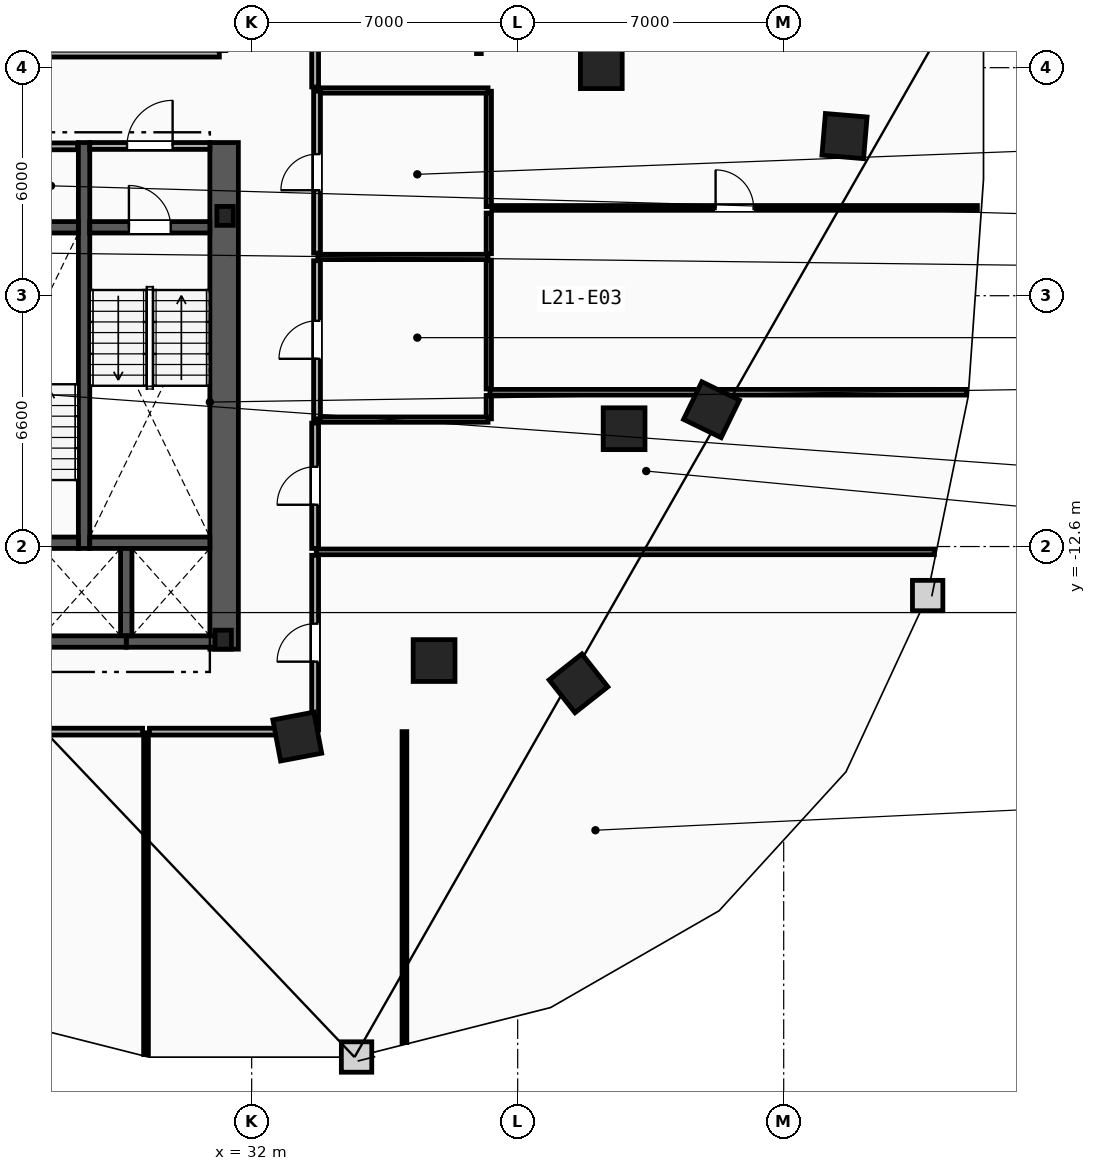
"""IFC4 building model, lengths in metres.
Left out: names, types, materials, properties, quantities, classifications, styles, units other than length and angle.
Written with IfcOpenShell. Run it as: python <this file> out.ifc"""

import sys

from ifc_helpers import new_model, si_unit, direction, frame, frame_2d, origin, origin_2d, place, context, subcontext, project, spatial, rectangle, i_section, extrude, element, fill, save


model = new_model("IFC4")
c1 = context("Model", 3, precision=1e-05, world=origin(), true_north=direction((0.0, 1.0)))
c2 = subcontext(c1, "Body", "Model", "MODEL_VIEW")
j1 = project(units=[si_unit("LENGTHUNIT", "METRE"), si_unit("PLANEANGLEUNIT", "RADIAN")], contexts=[c1])
p1 = place(None, origin())
s1 = spatial("IfcSite", under=j1, at=p1, CompositionType="ELEMENT")
p2 = place(p1, origin())
s2 = spatial("IfcBuilding", under=s1, at=p2, CompositionType="ELEMENT")
p3 = place(p2, frame((0.0, 0.0, 85.4)))
s3 = spatial("IfcBuildingStorey", under=s2, at=p3, CompositionType="ELEMENT", Elevation=85.4)
for number, where, z_axis, x_axis in (
    (1, (31.3, -3.9, 0.0), (0.0, 0.0, 1.0), (1.0, 0.0, 0.0)),
    (2, (31.25, -15.05, 0.0), (0.0, 0.0, 1.0), (1.0, 0.0, 0.0)),
):
    element("IfcColumn", number, at=place(p3, frame(where, z_axis=z_axis, x_axis=x_axis)), inside=s3, PredefinedType="COLUMN", context=c2, shape_type="SweptSolid", body=[
        extrude(i_section(OverallWidth=0.432, OverallDepth=0.498, WebThickness=0.056, FlangeThickness=0.089, FilletRadius=0.018, at=origin_2d()), origin(), (0.0, 0.0, 1.0), 3.6),
    ])
for number, where, z_axis, x_axis in (
    (3, (41.2, 0.0, 0.0), (0.0, 0.0, 1.0), (1.0, 0.0, 0.0)),
    (4, (41.8, -9.5, 0.0), (0.0, 0.0, 1.0), (1.0, 0.0, 0.0)),
    (5, (36.8, -15.6, 0.0), (0.0, 0.0, 1.0), (1.0, 0.0, 0.0)),
    (6, (33.2, -17.6, 0.0), (0.0, 0.0, 1.0), (0.983, 0.186, 0.0)),
    (7, (40.6, -16.2, 0.0), (0.0, 0.0, 1.0), (0.785, 0.619, 0.0)),
    (8, (44.1, -9.0, 0.0), (0.0, 0.0, 1.0), (0.437, 0.899, 0.0)),
    (9, (47.6, -1.8, 0.0), (0.0, 0.0, 1.0), (0.084, 0.997, 0.0)),
):
    element("IfcColumn", number, at=place(p3, frame(where, z_axis=z_axis, x_axis=x_axis)), inside=s3, PredefinedType="COLUMN", context=c2, shape_type="SweptSolid", body=[
        extrude(rectangle(XDim=1.1, YDim=1.1, at=origin_2d()), origin(), (0.0, 0.0, 1.0), 3.6),
    ])
p4 = place(p3, frame((31.275, -15.3, 0.0), z_axis=(0.0, 0.0, 1.0), x_axis=(0.0, 1.0, 0.0)))
e10 = element("IfcWall", 10, at=p4, inside=s3, PredefinedType="SHEAR", context=c2, shape_type="SweptSolid", body=[
    extrude(rectangle(XDim=13.33, YDim=0.75, at=frame_2d((6.665, 0.0))), origin(), (0.0, 0.0, 1.0), 3.3),
])
p5 = place(p3, frame((27.59, -12.65, 0.0), z_axis=(0.0, 0.0, 1.0), x_axis=(0.0, 1.0, 0.0)))
e11 = element("IfcWall", 11, at=p5, inside=s3, PredefinedType="SHEAR", context=c2, shape_type="SweptSolid", body=[
    extrude(rectangle(XDim=10.68, YDim=0.3, at=frame_2d((5.34, 0.0))), origin(), (0.0, 0.0, 1.0), 3.3),
])
p6 = place(p3, frame((27.74, -4.2, 0.0), z_axis=(0.0, 0.0, 1.0), x_axis=(1.0, 0.0, 0.0)))
e12 = element("IfcWall", 12, at=p6, inside=s3, PredefinedType="SHEAR", context=c2, shape_type="SweptSolid", body=[
    extrude(rectangle(XDim=3.16, YDim=0.3, at=frame_2d((1.58, 0.0))), origin(), (0.0, 0.0, 1.0), 3.3),
])
p7 = place(p6, frame((1.03, 0.0, 0.0)))
e13 = element("IfcOpeningElement", 13, at=p7, cuts=e12, PredefinedType="OPENING", context=c2, shape_type="SweptSolid", body=[
    extrude(rectangle(XDim=1.1, YDim=2.15, at=frame_2d((0.55, 1.075))), frame((0.0, 0.16, 0.0), z_axis=(0.0, -1.0, 0.0), x_axis=(1.0, 0.0, 0.0)), (0.0, 0.0, 1.0), 0.32),
])
p8 = place(p3, frame((27.74, -12.5, 0.0), z_axis=(0.0, 0.0, 1.0), x_axis=(1.0, 0.0, 0.0)))
e14 = element("IfcWall", 14, at=p8, inside=s3, PredefinedType="SHEAR", context=c2, shape_type="SweptSolid", body=[
    extrude(rectangle(XDim=3.16, YDim=0.3, at=frame_2d((1.58, 0.0))), origin(), (0.0, 0.0, 1.0), 3.3),
])
p9 = place(p3, frame((24.28, -12.5, 0.0), z_axis=(0.0, 0.0, 1.0), x_axis=(1.0, 0.0, 0.0)))
e15 = element("IfcWall", 15, at=p9, inside=s3, PredefinedType="SHEAR", context=c2, shape_type="SweptSolid", body=[
    extrude(rectangle(XDim=3.16, YDim=0.3, at=frame_2d((1.58, 0.0))), origin(), (0.0, 0.0, 1.0), 3.3),
])
p10 = place(p9, frame((1.03, 0.0, 0.0)))
e16 = element("IfcOpeningElement", 16, at=p10, cuts=e15, PredefinedType="OPENING", context=c2, shape_type="SweptSolid", body=[
    extrude(rectangle(XDim=1.1, YDim=2.15, at=frame_2d((0.55, 1.075))), frame((0.0, 0.16, 0.0), z_axis=(0.0, -1.0, 0.0), x_axis=(1.0, 0.0, 0.0)), (0.0, 0.0, 1.0), 0.32),
])
p11 = place(p3, frame((24.28, -4.2, 0.0), z_axis=(0.0, 0.0, 1.0), x_axis=(1.0, 0.0, 0.0)))
e17 = element("IfcWall", 17, at=p11, inside=s3, PredefinedType="SHEAR", context=c2, shape_type="SweptSolid", body=[
    extrude(rectangle(XDim=3.16, YDim=0.3, at=frame_2d((1.58, 0.0))), origin(), (0.0, 0.0, 1.0), 3.3),
])
p12 = place(p3, frame((27.74, -2.06, 0.0), z_axis=(0.0, 0.0, 1.0), x_axis=(1.0, 0.0, 0.0)))
e18 = element("IfcWall", 18, at=p12, inside=s3, PredefinedType="PARTITIONING", context=c2, shape_type="SweptSolid", body=[
    extrude(rectangle(XDim=3.16, YDim=0.18, at=frame_2d((1.58, 0.0))), origin(), (0.0, 0.0, 1.0), 3.3),
])
p13 = place(p12, frame((0.98, 0.0, 0.0)))
e19 = element("IfcOpeningElement", 19, at=p13, cuts=e18, PredefinedType="OPENING", context=c2, shape_type="SweptSolid", body=[
    extrude(rectangle(XDim=1.2, YDim=2.15, at=frame_2d((0.6, 1.075))), frame((0.0, 0.1, 0.0), z_axis=(0.0, -1.0, 0.0), x_axis=(1.0, 0.0, 0.0)), (0.0, 0.0, 1.0), 0.2),
])
p14 = place(p3, frame((28.7, -15.1, 0.0), z_axis=(0.0, 0.0, 1.0), x_axis=(1.0, 0.0, 0.0)))
e20 = element("IfcWall", 20, at=p14, inside=s3, PredefinedType="SHEAR", context=c2, shape_type="SweptSolid", body=[
    extrude(rectangle(XDim=2.5, YDim=0.3, at=frame_2d((1.25, 0.0))), origin(), (0.0, 0.0, 1.0), 3.3),
])
p15 = place(p3, frame((28.7, -14.95, 0.0), z_axis=(0.0, 0.0, 1.0), x_axis=(0.0, 1.0, 0.0)))
e21 = element("IfcWall", 21, at=p15, inside=s3, PredefinedType="SHEAR", context=c2, shape_type="SweptSolid", body=[
    extrude(rectangle(XDim=2.3, YDim=0.3, at=frame_2d((1.15, 0.0))), origin(), (0.0, 0.0, 1.0), 3.3),
])
p16 = place(p3, frame((26.2, -15.1, 0.0), z_axis=(0.0, 0.0, 1.0), x_axis=(1.0, 0.0, 0.0)))
e22 = element("IfcWall", 22, at=p16, inside=s3, PredefinedType="SHEAR", context=c2, shape_type="SweptSolid", body=[
    extrude(rectangle(XDim=2.5, YDim=0.3, at=frame_2d((1.25, 0.0))), origin(), (0.0, 0.0, 1.0), 3.3),
])
p17 = place(p3, frame((24.3, -2.07, 0.0), z_axis=(0.0, 0.0, 1.0), x_axis=(1.0, 0.0, 0.0)))
e23 = element("IfcWall", 23, at=p17, inside=s3, PredefinedType="PARTITIONING", context=c2, shape_type="SweptSolid", body=[
    extrude(rectangle(XDim=3.12, YDim=0.18, at=frame_2d((1.56, 0.0))), origin(), (0.0, 0.0, 1.0), 3.3),
])
p18 = place(p17, frame((1.085, 0.0, 0.0)))
e24 = element("IfcOpeningElement", 24, at=p18, cuts=e23, PredefinedType="OPENING", context=c2, shape_type="SweptSolid", body=[
    extrude(rectangle(XDim=0.95, YDim=2.1, at=frame_2d((0.475, 1.05))), frame((0.0, 0.1, 0.0), z_axis=(0.0, -1.0, 0.0), x_axis=(1.0, 0.0, 0.0)), (0.0, 0.0, 1.0), 0.2),
])
p19 = place(p3, frame((38.24, -9.24, 0.0), z_axis=(0.0, 0.0, 1.0), x_axis=(0.0, 1.0, 0.0)))
e25 = element("IfcWall", 25, at=p19, inside=s3, PredefinedType="PARTITIONING", context=c2, shape_type="SweptSolid", body=[
    extrude(rectangle(XDim=0.615, YDim=0.14, at=frame_2d((0.308, 0.0))), origin(), (0.0, 0.0, 1.0), 3.3),
])
p20 = place(p3, frame((38.24, -8.455, 0.0), z_axis=(0.0, 0.0, 1.0), x_axis=(0.0, 1.0, 0.0)))
e26 = element("IfcWall", 26, at=p20, inside=s3, PredefinedType="PARTITIONING", context=c2, shape_type="SweptSolid", body=[
    extrude(rectangle(XDim=3.39, YDim=0.14, at=frame_2d((1.695, 0.0))), origin(), (0.0, 0.0, 1.0), 3.3),
])
p21 = place(p3, frame((38.24, -4.895, 0.0), z_axis=(0.0, 0.0, 1.0), x_axis=(0.0, 1.0, 0.0)))
e27 = element("IfcWall", 27, at=p21, inside=s3, PredefinedType="PARTITIONING", context=c2, shape_type="SweptSolid", body=[
    extrude(rectangle(XDim=1.07, YDim=0.14, at=frame_2d((0.535, 0.0))), origin(), (0.0, 0.0, 1.0), 3.3),
])
p22 = place(p3, frame((38.24, -3.655, 0.0), z_axis=(0.0, 0.0, 1.0), x_axis=(0.0, 1.0, 0.0)))
e28 = element("IfcWall", 28, at=p22, inside=s3, PredefinedType="PARTITIONING", context=c2, shape_type="SweptSolid", body=[
    extrude(rectangle(XDim=3.035, YDim=0.14, at=frame_2d((1.518, 0.0))), origin(), (0.0, 0.0, 1.0), 3.3),
])
for number, where, z_axis, x_axis in (
    (29, (33.74, -0.6, 0.0), (0.0, 0.0, 1.0), (1.0, 0.0, 0.0)),
    (30, (33.74, -4.98, 0.0), (0.0, 0.0, 1.0), (1.0, 0.0, 0.0)),
    (31, (33.74, -9.26, 0.0), (0.0, 0.0, 1.0), (1.0, 0.0, 0.0)),
):
    element("IfcWall", number, at=place(p3, frame(where, z_axis=z_axis, x_axis=x_axis)), inside=s3, PredefinedType="PARTITIONING", context=c2, shape_type="SweptSolid", body=[
        extrude(rectangle(XDim=4.48, YDim=0.14, at=frame_2d((2.24, 0.0))), origin(), (0.0, 0.0, 1.0), 3.3),
    ])
p23 = place(p3, frame((33.72, -4.88, 0.0), z_axis=(0.0, 0.0, 1.0), x_axis=(0.0, 1.0, 0.0)))
e32 = element("IfcWall", 32, at=p23, inside=s3, PredefinedType="PARTITIONING", context=c2, shape_type="SweptSolid", body=[
    extrude(rectangle(XDim=4.26, YDim=0.18, at=frame_2d((2.13, 0.0))), origin(), (0.0, 0.0, 1.0), 3.3),
])
p24 = place(p23, frame((1.655, 0.0, 0.0)))
e33 = element("IfcOpeningElement", 33, at=p24, cuts=e32, PredefinedType="OPENING", context=c2, shape_type="SweptSolid", body=[
    extrude(rectangle(XDim=0.95, YDim=2.1, at=frame_2d((0.475, 1.05))), frame((0.0, 0.1, 0.0), z_axis=(0.0, -1.0, 0.0), x_axis=(1.0, 0.0, 0.0)), (0.0, 0.0, 1.0), 0.2),
])
p25 = place(p3, frame((33.72, -9.24, 0.0), z_axis=(0.0, 0.0, 1.0), x_axis=(0.0, 1.0, 0.0)))
e34 = element("IfcWall", 34, at=p25, inside=s3, PredefinedType="PARTITIONING", context=c2, shape_type="SweptSolid", body=[
    extrude(rectangle(XDim=4.16, YDim=0.18, at=frame_2d((2.08, 0.0))), origin(), (0.0, 0.0, 1.0), 3.3),
])
p26 = place(p25, frame((1.58, 0.0, 0.0)))
e35 = element("IfcOpeningElement", 35, at=p26, cuts=e34, PredefinedType="OPENING", context=c2, shape_type="SweptSolid", body=[
    extrude(rectangle(XDim=1.0, YDim=2.15, at=frame_2d((0.5, 1.075))), frame((0.0, 0.1, 0.0), z_axis=(0.0, -1.0, 0.0), x_axis=(1.0, 0.0, 0.0)), (0.0, 0.0, 1.0), 0.2),
])
p27 = place(p3, frame((37.98, 0.37, 0.0), z_axis=(0.0, 0.0, 1.0), x_axis=(0.0, 1.0, 0.0)))
e36 = element("IfcWall", 36, at=p27, inside=s3, PredefinedType="PARTITIONING", context=c2, shape_type="SweptSolid", body=[
    extrude(rectangle(XDim=11.08, YDim=0.125, at=frame_2d((5.54, 0.0))), origin(), (0.0, 0.0, 1.0), 3.3),
])
p28 = place(p3, frame((38.27, -8.54, 0.0), z_axis=(0.0, 0.0, 1.0), x_axis=(1.0, 0.0, 0.0)))
e37 = element("IfcWall", 37, at=p28, inside=s3, PredefinedType="PARTITIONING", context=c2, shape_type="SweptSolid", body=[
    extrude(rectangle(XDim=12.543, YDim=0.15, at=frame_2d((6.271, 0.0))), origin(), (0.0, 0.0, 1.0), 3.3),
])
p29 = place(p3, frame((33.7, -12.74, 0.0), z_axis=(0.0, 0.0, 1.0), x_axis=(1.0, 0.0, 0.0)))
e38 = element("IfcWall", 38, at=p29, inside=s3, PredefinedType="PARTITIONING", context=c2, shape_type="SweptSolid", body=[
    extrude(rectangle(XDim=16.264, YDim=0.15, at=frame_2d((8.132, 0.0))), origin(), (0.0, 0.0, 1.0), 3.3),
])
p30 = place(p3, frame((29.22, -25.966, 0.0), z_axis=(0.0, 0.0, 1.0), x_axis=(0.0, 1.0, 0.0)))
e39 = element("IfcWall", 39, at=p30, inside=s3, PredefinedType="PARTITIONING", context=c2, shape_type="SweptSolid", body=[
    extrude(rectangle(XDim=8.466, YDim=0.125, at=frame_2d((4.233, 0.0))), origin(), (0.0, 0.0, 1.0), 3.3),
])
p31 = place(p3, frame((36.02, -25.652, 0.0), z_axis=(0.0, 0.0, 1.0), x_axis=(0.0, 1.0, 0.0)))
e40 = element("IfcWall", 40, at=p31, inside=s3, PredefinedType="PARTITIONING", context=c2, shape_type="SweptSolid", body=[
    extrude(rectangle(XDim=8.182, YDim=0.125, at=frame_2d((4.091, 0.0))), origin(), (0.0, 0.0, 1.0), 3.3),
])
p32 = place(p3, frame((33.67, -17.428, 0.0), z_axis=(0.0, 0.0, 1.0), x_axis=(0.0, 1.0, 0.0)))
e41 = element("IfcWall", 41, at=p32, inside=s3, PredefinedType="PARTITIONING", context=c2, shape_type="SweptSolid", body=[
    extrude(rectangle(XDim=4.598, YDim=0.18, at=frame_2d((2.299, 0.0))), origin(), (0.0, 0.0, 1.0), 3.3),
])
p33 = place(p32, frame((1.799, 0.0, 0.0)))
e42 = element("IfcOpeningElement", 42, at=p33, cuts=e41, PredefinedType="OPENING", context=c2, shape_type="SweptSolid", body=[
    extrude(rectangle(XDim=1.0, YDim=2.15, at=frame_2d((0.5, 1.075))), frame((0.0, 0.1, 0.0), z_axis=(0.0, -1.0, 0.0), x_axis=(1.0, 0.0, 0.0)), (0.0, 0.0, 1.0), 0.2),
])
p34 = place(p3, frame((29.31, -17.47, 0.0), z_axis=(0.0, 0.0, 1.0), x_axis=(1.0, 0.0, 0.0)))
e43 = element("IfcWall", 43, at=p34, inside=s3, PredefinedType="PARTITIONING", context=c2, shape_type="SweptSolid", body=[
    extrude(rectangle(XDim=4.318, YDim=0.18, at=frame_2d((2.159, 0.0))), origin(), (0.0, 0.0, 1.0), 3.3),
])
p35 = place(p3, frame((33.67, -12.65, 0.0), z_axis=(0.0, 0.0, 1.0), x_axis=(0.0, 1.0, 0.0)))
e44 = element("IfcWall", 44, at=p35, inside=s3, PredefinedType="PARTITIONING", context=c2, shape_type="SweptSolid", body=[
    extrude(rectangle(XDim=3.299, YDim=0.18, at=frame_2d((1.649, 0.0))), origin(), (0.0, 0.0, 1.0), 3.3),
])
p36 = place(p35, frame((1.149, 0.0, 0.0)))
e45 = element("IfcOpeningElement", 45, at=p36, cuts=e44, PredefinedType="OPENING", context=c2, shape_type="SweptSolid", body=[
    extrude(rectangle(XDim=1.0, YDim=2.15, at=frame_2d((0.5, 1.075))), frame((0.0, 0.1, 0.0), z_axis=(0.0, -1.0, 0.0), x_axis=(1.0, 0.0, 0.0)), (0.0, 0.0, 1.0), 0.2),
])
p37 = place(p3, frame((31.15, 0.37, 0.0), z_axis=(0.0, 0.0, 1.0), x_axis=(-1.0, 0.0, 0.0)))
e46 = element("IfcWall", 46, at=p37, inside=s3, PredefinedType="PARTITIONING", context=c2, shape_type="SweptSolid", body=[
    extrude(rectangle(XDim=14.328, YDim=0.18, at=frame_2d((7.164, 0.0))), origin(), (0.0, 0.0, 1.0), 3.3),
])
p38 = place(p37, frame((6.664, 0.0, 0.0)))
e47 = element("IfcOpeningElement", 47, at=p38, cuts=e46, PredefinedType="OPENING", context=c2, shape_type="SweptSolid", body=[
    extrude(rectangle(XDim=1.0, YDim=2.15, at=frame_2d((0.5, 1.075))), frame((0.0, 0.1, 0.0), z_axis=(0.0, -1.0, 0.0), x_axis=(1.0, 0.0, 0.0)), (0.0, 0.0, 1.0), 0.2),
])
p39 = place(p3, frame((16.822, -17.47, 0.0), z_axis=(0.0, 0.0, 1.0), x_axis=(1.0, 0.0, 0.0)))
e48 = element("IfcWall", 48, at=p39, inside=s3, PredefinedType="PARTITIONING", context=c2, shape_type="SweptSolid", body=[
    extrude(rectangle(XDim=12.308, YDim=0.18, at=frame_2d((6.154, 0.0))), origin(), (0.0, 0.0, 1.0), 3.3),
])
p40 = place(p3, frame((33.67, -0.509, 0.0), z_axis=(0.0, 0.0, 1.0), x_axis=(0.0, 1.0, 0.0)))
e49 = element("IfcWall", 49, at=p40, inside=s3, PredefinedType="PARTITIONING", context=c2, shape_type="SweptSolid", body=[
    extrude(rectangle(XDim=11.908, YDim=0.18, at=frame_2d((5.954, 0.0))), origin(), (0.0, 0.0, 1.0), 3.3),
])
p41 = place(p40, frame((5.454, 0.0, 0.0)))
e50 = element("IfcOpeningElement", 50, at=p41, cuts=e49, PredefinedType="OPENING", context=c2, shape_type="SweptSolid", body=[
    extrude(rectangle(XDim=1.0, YDim=2.15, at=frame_2d((0.5, 1.075))), frame((0.0, 0.1, 0.0), z_axis=(0.0, -1.0, 0.0), x_axis=(1.0, 0.0, 0.0)), (0.0, 0.0, 1.0), 0.2),
])
p42 = place(p3, frame((38.32, -3.69, 0.0), z_axis=(0.0, 0.0, 1.0), x_axis=(1.0, 0.0, 0.0)))
e51 = element("IfcWall", 51, at=p42, inside=s3, PredefinedType="PARTITIONING", context=c2, shape_type="SweptSolid", body=[
    extrude(rectangle(XDim=12.776, YDim=0.125, at=frame_2d((6.388, 0.0))), origin(), (0.0, 0.0, 1.0), 3.3),
])
p43 = place(p42, frame((5.888, 0.0, 0.0)))
e52 = element("IfcOpeningElement", 52, at=p43, cuts=e51, PredefinedType="OPENING", context=c2, shape_type="SweptSolid", body=[
    extrude(rectangle(XDim=1.0, YDim=2.15, at=frame_2d((0.5, 1.075))), frame((0.0, 0.073, 0.0), z_axis=(0.0, -1.0, 0.0), x_axis=(1.0, 0.0, 0.0)), (0.0, 0.0, 1.0), 0.145),
])
p44 = place(p7, origin())
e53 = element("IfcDoor", 53, at=p44, inside=s3, OperationType="SINGLE_SWING_LEFT", PredefinedType="DOOR", context=c2, shape_type="SweptSolid", body=[
    extrude(rectangle(XDim=1.1, YDim=2.15, at=frame_2d((0.55, 1.075))), frame((0.0, 0.025, 0.0), z_axis=(0.0, -1.0, 0.0), x_axis=(1.0, 0.0, 0.0)), (0.0, 0.0, 1.0), 0.05),
])
fill(e13, e53)
p45 = place(p13, origin())
e54 = element("IfcDoor", 54, at=p45, inside=s3, OperationType="SINGLE_SWING_RIGHT", PredefinedType="DOOR", context=c2, shape_type="SweptSolid", body=[
    extrude(rectangle(XDim=1.2, YDim=2.15, at=frame_2d((0.6, 1.075))), frame((0.0, 0.025, 0.0), z_axis=(0.0, -1.0, 0.0), x_axis=(1.0, 0.0, 0.0)), (0.0, 0.0, 1.0), 0.05),
])
fill(e19, e54)
p46 = place(p43, origin())
e55 = element("IfcDoor", 55, at=p46, inside=s3, OperationType="SINGLE_SWING_LEFT", PredefinedType="DOOR", context=c2, shape_type="SweptSolid", body=[
    extrude(rectangle(XDim=1.0, YDim=2.15, at=frame_2d((0.5, 1.075))), frame((0.0, 0.025, 0.0), z_axis=(0.0, -1.0, 0.0), x_axis=(1.0, 0.0, 0.0)), (0.0, 0.0, 1.0), 0.05),
])
fill(e52, e55)
p47 = place(p33, origin())
e56 = element("IfcDoor", 56, at=p47, inside=s3, OperationType="SINGLE_SWING_LEFT", PredefinedType="DOOR", context=c2, shape_type="SweptSolid", body=[
    extrude(rectangle(XDim=1.0, YDim=2.15, at=frame_2d((0.5, 1.075))), frame((0.0, 0.025, 0.0), z_axis=(0.0, -1.0, 0.0), x_axis=(1.0, 0.0, 0.0)), (0.0, 0.0, 1.0), 0.05),
])
fill(e42, e56)
p48 = place(p24, origin())
e57 = element("IfcDoor", 57, at=p48, inside=s3, OperationType="SINGLE_SWING_LEFT", PredefinedType="DOOR", context=c2, shape_type="SweptSolid", body=[
    extrude(rectangle(XDim=0.95, YDim=2.1, at=frame_2d((0.475, 1.05))), frame((0.0, 0.025, 0.0), z_axis=(0.0, -1.0, 0.0), x_axis=(1.0, 0.0, 0.0)), (0.0, 0.0, 1.0), 0.05),
])
fill(e33, e57)
p49 = place(p26, origin())
e58 = element("IfcDoor", 58, at=p49, inside=s3, OperationType="SINGLE_SWING_LEFT", PredefinedType="DOOR", context=c2, shape_type="SweptSolid", body=[
    extrude(rectangle(XDim=1.0, YDim=2.15, at=frame_2d((0.5, 1.075))), frame((0.0, 0.025, 0.0), z_axis=(0.0, -1.0, 0.0), x_axis=(1.0, 0.0, 0.0)), (0.0, 0.0, 1.0), 0.05),
])
fill(e35, e58)
p50 = place(p36, origin())
e59 = element("IfcDoor", 59, at=p50, inside=s3, OperationType="SINGLE_SWING_LEFT", PredefinedType="DOOR", context=c2, shape_type="SweptSolid", body=[
    extrude(rectangle(XDim=1.0, YDim=2.15, at=frame_2d((0.5, 1.075))), frame((0.0, 0.025, 0.0), z_axis=(0.0, -1.0, 0.0), x_axis=(1.0, 0.0, 0.0)), (0.0, 0.0, 1.0), 0.05),
])
fill(e45, e59)
save(model, sys.argv[1])
